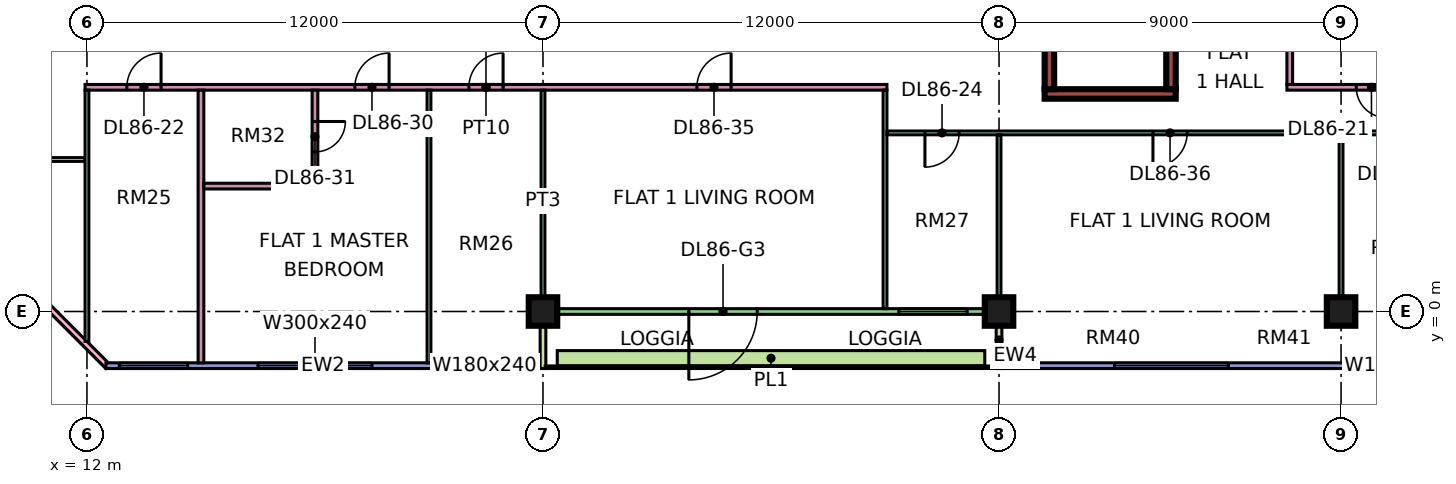
"""IFC4 building model, lengths in metres.
Left out: names, types, materials, properties, quantities, classifications, styles, units other than length and angle.
Written with IfcOpenShell. Run it as: python <this file> out.ifc"""

import sys

from ifc_helpers import new_model, si_unit, direction, frame, frame_2d, origin, origin_2d, place, context, subcontext, project, spatial, rectangle, extrude, element, fill, save


model = new_model("IFC4")
c1 = context("Model", 3, precision=1e-05, world=origin(), true_north=direction((0.0, 1.0)))
c2 = subcontext(c1, "Body", "Model", "MODEL_VIEW")
j1 = project(units=[si_unit("LENGTHUNIT", "METRE"), si_unit("PLANEANGLEUNIT", "RADIAN")], contexts=[c1])
p1 = place(None, origin())
s1 = spatial("IfcSite", under=j1, at=p1, CompositionType="ELEMENT")
p2 = place(p1, origin())
s2 = spatial("IfcBuilding", under=s1, at=p2, CompositionType="ELEMENT")
p3 = place(p2, frame((0.0, 0.0, 368.9)))
s3 = spatial("IfcBuildingStorey", under=s2, at=p3, CompositionType="ELEMENT", Elevation=368.9)
for number, where, z_axis, x_axis in (
    (1, (24.0, 0.0, 0.0), (0.0, 0.0, 1.0), (1.0, 0.0, 0.0)),
    (2, (36.0, 0.0, 0.0), (0.0, 0.0, 1.0), (1.0, 0.0, 0.0)),
    (3, (45.0, 0.0, 0.0), (0.0, 0.0, 1.0), (1.0, 0.0, 0.0)),
):
    element("IfcColumn", number, at=place(p3, frame(where, z_axis=z_axis, x_axis=x_axis)), inside=s3, PredefinedType="COLUMN", context=c2, shape_type="SweptSolid", body=[
        extrude(rectangle(XDim=0.75, YDim=0.75, at=origin_2d()), origin(), (0.0, 0.0, 1.0), 3.75),
    ])
p4 = place(p3, frame((37.2, 5.725, 0.0), z_axis=(0.0, 0.0, 1.0), x_axis=(1.0, 0.0, 0.0)))
e4 = element("IfcWall", 4, at=p4, inside=s3, PredefinedType="SHEAR", context=c2, shape_type="SweptSolid", body=[
    extrude(rectangle(XDim=3.45, YDim=0.25, at=frame_2d((1.725, 0.0))), origin(), (0.0, 0.0, 1.0), 3.75),
])
for number, where, z_axis, x_axis in (
    (5, (37.325, 5.85, 0.0), (0.0, 0.0, 1.0), (0.0, 1.0, 0.0)),
    (6, (40.525, 5.85, 0.0), (0.0, 0.0, 1.0), (0.0, 1.0, 0.0)),
):
    element("IfcWall", number, at=place(p3, frame(where, z_axis=z_axis, x_axis=x_axis)), inside=s3, PredefinedType="SHEAR", context=c2, shape_type="SweptSolid", body=[
        extrude(rectangle(XDim=6.5, YDim=0.25, at=frame_2d((3.25, 0.0))), origin(), (0.0, 0.0, 1.0), 3.75),
    ])
p5 = place(p3, frame((-1.447, 12.553, 0.0), z_axis=(0.0, 0.0, 1.0), x_axis=(0.707106781187, -0.707106781187, 0.0)))
e7 = element("IfcWall", 7, at=p5, inside=s3, PredefinedType="SOLIDWALL", context=c2, shape_type="SweptSolid", body=[
    extrude(rectangle(XDim=19.799, YDim=0.15, at=frame_2d((9.899, 0.0))), origin(), (0.0, 0.0, 1.0), 3.35),
])
p6 = place(p5, frame((2.212, 0.0, 0.45)))
e8 = element("IfcOpeningElement", 8, at=p6, cuts=e7, PredefinedType="OPENING", context=c2, shape_type="SweptSolid", body=[
    extrude(rectangle(XDim=3.0, YDim=2.4, at=frame_2d((1.5, 1.2))), frame((0.0, 0.085, 0.0), z_axis=(0.0, -1.0, 0.0), x_axis=(1.0, 0.0, 0.0)), (0.0, 0.0, 1.0), 0.17),
])
p7 = place(p5, frame((10.216, 0.0, 0.45)))
e9 = element("IfcOpeningElement", 9, at=p7, cuts=e7, PredefinedType="OPENING", context=c2, shape_type="SweptSolid", body=[
    extrude(rectangle(XDim=3.0, YDim=2.4, at=frame_2d((1.5, 1.2))), frame((0.0, 0.085, 0.0), z_axis=(0.0, -1.0, 0.0), x_axis=(1.0, 0.0, 0.0)), (0.0, 0.0, 1.0), 0.17),
])
p8 = place(p3, frame((12.5, -1.425, 0.0), z_axis=(0.0, 0.0, 1.0), x_axis=(1.0, 0.0, 0.0)))
e10 = element("IfcWall", 10, at=p8, inside=s3, PredefinedType="SOLIDWALL", context=c2, shape_type="SweptSolid", body=[
    extrude(rectangle(XDim=11.425, YDim=0.15, at=frame_2d((5.712, 0.0))), origin(), (0.0, 0.0, 1.0), 3.35),
])
p9 = place(p8, frame((0.35, 0.0, 0.45)))
e11 = element("IfcOpeningElement", 11, at=p9, cuts=e10, PredefinedType="OPENING", context=c2, shape_type="SweptSolid", body=[
    extrude(rectangle(XDim=1.8, YDim=2.4, at=frame_2d((0.9, 1.2))), frame((0.0, 0.085, 0.0), z_axis=(0.0, -1.0, 0.0), x_axis=(1.0, 0.0, 0.0)), (0.0, 0.0, 1.0), 0.17),
])
p10 = place(p8, frame((4.0, 0.0, 0.45)))
e12 = element("IfcOpeningElement", 12, at=p10, cuts=e10, PredefinedType="OPENING", context=c2, shape_type="SweptSolid", body=[
    extrude(rectangle(XDim=3.0, YDim=2.4, at=frame_2d((1.5, 1.2))), frame((0.0, 0.085, 0.0), z_axis=(0.0, -1.0, 0.0), x_axis=(1.0, 0.0, 0.0)), (0.0, 0.0, 1.0), 0.17),
])
p11 = place(p8, frame((9.062, 0.0, 0.45)))
e13 = element("IfcOpeningElement", 13, at=p11, cuts=e10, PredefinedType="OPENING", context=c2, shape_type="SweptSolid", body=[
    extrude(rectangle(XDim=1.8, YDim=2.4, at=frame_2d((0.9, 1.2))), frame((0.0, 0.085, 0.0), z_axis=(0.0, -1.0, 0.0), x_axis=(1.0, 0.0, 0.0)), (0.0, 0.0, 1.0), 0.17),
])
p12 = place(p3, frame((24.075, 0.0, 0.0), z_axis=(0.0, 0.0, 1.0), x_axis=(1.0, 0.0, 0.0)))
e14 = element("IfcWall", 14, at=p12, inside=s3, PredefinedType="SOLIDWALL", context=c2, shape_type="SweptSolid", body=[
    extrude(rectangle(XDim=11.85, YDim=0.15, at=frame_2d((5.925, 0.0))), origin(), (0.0, 0.0, 1.0), 3.35),
])
p13 = place(p12, frame((3.762, 0.0, 0.0)))
e15 = element("IfcOpeningElement", 15, at=p13, cuts=e14, PredefinedType="OPENING", context=c2, shape_type="SweptSolid", body=[
    extrude(rectangle(XDim=1.8, YDim=2.4, at=frame_2d((0.9, 1.2))), frame((0.0, 0.085, 0.0), z_axis=(0.0, -1.0, 0.0), x_axis=(1.0, 0.0, 0.0)), (0.0, 0.0, 1.0), 0.17),
])
p14 = place(p12, frame((9.288, 0.0, 0.45)))
e16 = element("IfcOpeningElement", 16, at=p14, cuts=e14, PredefinedType="OPENING", context=c2, shape_type="SweptSolid", body=[
    extrude(rectangle(XDim=1.8, YDim=2.4, at=frame_2d((0.9, 1.2))), frame((0.0, 0.085, 0.0), z_axis=(0.0, -1.0, 0.0), x_axis=(1.0, 0.0, 0.0)), (0.0, 0.0, 1.0), 0.17),
])
for number, where, z_axis, x_axis in (
    (17, (24.0, -1.5, 0.0), (0.0, 0.0, 1.0), (0.0, 1.0, 0.0)),
    (18, (36.0, -1.5, 0.0), (0.0, 0.0, 1.0), (0.0, 1.0, 0.0)),
):
    element("IfcWall", number, at=place(p3, frame(where, z_axis=z_axis, x_axis=x_axis)), inside=s3, PredefinedType="SOLIDWALL", context=c2, shape_type="SweptSolid", body=[
        extrude(rectangle(XDim=1.5, YDim=0.15, at=frame_2d((0.75, 0.0))), origin(), (0.0, 0.0, 1.0), 3.35),
    ])
p15 = place(p3, frame((36.075, -1.425, 0.0), z_axis=(0.0, 0.0, 1.0), x_axis=(1.0, 0.0, 0.0)))
e19 = element("IfcWall", 19, at=p15, inside=s3, PredefinedType="SOLIDWALL", context=c2, shape_type="SweptSolid", body=[
    extrude(rectangle(XDim=11.85, YDim=0.15, at=frame_2d((5.925, 0.0))), origin(), (0.0, 0.0, 1.0), 3.35),
])
p16 = place(p15, frame((2.962, 0.0, 0.45)))
e20 = element("IfcOpeningElement", 20, at=p16, cuts=e19, PredefinedType="OPENING", context=c2, shape_type="SweptSolid", body=[
    extrude(rectangle(XDim=3.0, YDim=2.4, at=frame_2d((1.5, 1.2))), frame((0.0, 0.085, 0.0), z_axis=(0.0, -1.0, 0.0), x_axis=(1.0, 0.0, 0.0)), (0.0, 0.0, 1.0), 0.17),
])
p17 = place(p15, frame((9.488, 0.0, 0.45)))
e21 = element("IfcOpeningElement", 21, at=p17, cuts=e19, PredefinedType="OPENING", context=c2, shape_type="SweptSolid", body=[
    extrude(rectangle(XDim=1.8, YDim=2.4, at=frame_2d((0.9, 1.2))), frame((0.0, 0.085, 0.0), z_axis=(0.0, -1.0, 0.0), x_axis=(1.0, 0.0, 0.0)), (0.0, 0.0, 1.0), 0.17),
])
p18 = place(p3, frame((24.375, -1.229, 0.0), z_axis=(0.0, 0.0, 1.0), x_axis=(1.0, 0.0, 0.0)))
e22 = element("IfcWall", 22, at=p18, inside=s3, PredefinedType="SOLIDWALL", context=c2, shape_type="SweptSolid", body=[
    extrude(rectangle(XDim=11.25, YDim=0.4, at=frame_2d((5.625, 0.0))), origin(), (0.0, 0.0, 1.0), 0.7),
])
p19 = place(p3, frame((9.05, 4.0, 0.0), z_axis=(0.0, 0.0, 1.0), x_axis=(1.0, 0.0, 0.0)))
e23 = element("IfcWall", 23, at=p19, inside=s3, PredefinedType="PARTITIONING", context=c2, shape_type="SweptSolid", body=[
    extrude(rectangle(XDim=2.9, YDim=0.1, at=frame_2d((1.45, 0.0))), origin(), (0.0, 0.0, 1.0), 3.35),
])
p20 = place(p3, frame((11.95, 5.9, 0.0), z_axis=(0.0, 0.0, 1.0), x_axis=(1.0, 0.0, 0.0)))
e24 = element("IfcWall", 24, at=p20, inside=s3, PredefinedType="PARTITIONING", context=c2, shape_type="SweptSolid", body=[
    extrude(rectangle(XDim=21.1, YDim=0.15, at=frame_2d((10.55, 0.0))), origin(), (0.0, 0.0, 1.0), 3.35),
])
p21 = place(p20, frame((1.1, 0.0, 0.0)))
e25 = element("IfcOpeningElement", 25, at=p21, cuts=e24, PredefinedType="OPENING", context=c2, shape_type="SweptSolid", body=[
    extrude(rectangle(XDim=0.9, YDim=2.1, at=frame_2d((0.45, 1.05))), frame((0.0, 0.085, 0.0), z_axis=(0.0, -1.0, 0.0), x_axis=(1.0, 0.0, 0.0)), (0.0, 0.0, 1.0), 0.17),
])
p22 = place(p20, frame((10.1, 0.0, 0.0)))
e26 = element("IfcOpeningElement", 26, at=p22, cuts=e24, PredefinedType="OPENING", context=c2, shape_type="SweptSolid", body=[
    extrude(rectangle(XDim=0.9, YDim=2.1, at=frame_2d((0.45, 1.05))), frame((0.0, 0.085, 0.0), z_axis=(0.0, -1.0, 0.0), x_axis=(1.0, 0.0, 0.0)), (0.0, 0.0, 1.0), 0.17),
])
p23 = place(p20, frame((7.1, 0.0, 0.0)))
e27 = element("IfcOpeningElement", 27, at=p23, cuts=e24, PredefinedType="OPENING", context=c2, shape_type="SweptSolid", body=[
    extrude(rectangle(XDim=0.9, YDim=2.1, at=frame_2d((0.45, 1.05))), frame((0.0, 0.085, 0.0), z_axis=(0.0, -1.0, 0.0), x_axis=(1.0, 0.0, 0.0)), (0.0, 0.0, 1.0), 0.17),
])
p24 = place(p20, frame((16.1, 0.0, 0.0)))
e28 = element("IfcOpeningElement", 28, at=p24, cuts=e24, PredefinedType="OPENING", context=c2, shape_type="SweptSolid", body=[
    extrude(rectangle(XDim=0.9, YDim=2.1, at=frame_2d((0.45, 1.05))), frame((0.0, 0.085, 0.0), z_axis=(0.0, -1.0, 0.0), x_axis=(1.0, 0.0, 0.0)), (0.0, 0.0, 1.0), 0.17),
])
p25 = place(p3, frame((12.0, -0.788, 0.0), z_axis=(0.0, 0.0, 1.0), x_axis=(0.0, 1.0, 0.0)))
e29 = element("IfcWall", 29, at=p25, inside=s3, PredefinedType="PARTITIONING", context=c2, shape_type="SweptSolid", body=[
    extrude(rectangle(XDim=6.613, YDim=0.1, at=frame_2d((3.306, 0.0))), origin(), (0.0, 0.0, 1.0), 3.35),
])
p26 = place(p3, frame((15.0, -1.351, 0.0), z_axis=(0.0, 0.0, 1.0), x_axis=(0.0, 1.0, 0.0)))
e30 = element("IfcWall", 30, at=p26, inside=s3, PredefinedType="PARTITIONING", context=c2, shape_type="SweptSolid", body=[
    extrude(rectangle(XDim=7.176, YDim=0.15, at=frame_2d((3.588, 0.0))), origin(), (0.0, 0.0, 1.0), 3.35),
])
p27 = place(p3, frame((15.075, 3.3, 0.0), z_axis=(0.0, 0.0, 1.0), x_axis=(1.0, 0.0, 0.0)))
e31 = element("IfcWall", 31, at=p27, inside=s3, PredefinedType="PARTITIONING", context=c2, shape_type="SweptSolid", body=[
    extrude(rectangle(XDim=3.0, YDim=0.15, at=frame_2d((1.5, 0.0))), origin(), (0.0, 0.0, 1.0), 3.35),
])
p28 = place(p3, frame((18.0, 3.375, 0.0), z_axis=(0.0, 0.0, 1.0), x_axis=(0.0, 1.0, 0.0)))
e32 = element("IfcWall", 32, at=p28, inside=s3, PredefinedType="PARTITIONING", context=c2, shape_type="SweptSolid", body=[
    extrude(rectangle(XDim=2.45, YDim=0.15, at=frame_2d((1.225, 0.0))), origin(), (0.0, 0.0, 1.0), 3.35),
])
p29 = place(p28, frame((0.825, 0.0, 0.0)))
e33 = element("IfcOpeningElement", 33, at=p29, cuts=e32, PredefinedType="OPENING", context=c2, shape_type="SweptSolid", body=[
    extrude(rectangle(XDim=0.8, YDim=2.1, at=frame_2d((0.4, 1.05))), frame((0.0, 0.085, 0.0), z_axis=(0.0, -1.0, 0.0), x_axis=(1.0, 0.0, 0.0)), (0.0, 0.0, 1.0), 0.17),
])
p30 = place(p3, frame((21.0, -1.351, 0.0), z_axis=(0.0, 0.0, 1.0), x_axis=(0.0, 1.0, 0.0)))
e34 = element("IfcWall", 34, at=p30, inside=s3, PredefinedType="PARTITIONING", context=c2, shape_type="SweptSolid", body=[
    extrude(rectangle(XDim=7.176, YDim=0.1, at=frame_2d((3.588, 0.0))), origin(), (0.0, 0.0, 1.0), 3.35),
])
p31 = place(p3, frame((24.0, 0.0, 0.0), z_axis=(0.0, 0.0, 1.0), x_axis=(0.0, 1.0, 0.0)))
e35 = element("IfcWall", 35, at=p31, inside=s3, PredefinedType="PARTITIONING", context=c2, shape_type="SweptSolid", body=[
    extrude(rectangle(XDim=5.825, YDim=0.1, at=frame_2d((2.913, 0.0))), origin(), (0.0, 0.0, 1.0), 3.35),
])
p32 = place(p3, frame((33.0, 0.074, 0.0), z_axis=(0.0, 0.0, 1.0), x_axis=(0.0, 1.0, 0.0)))
e36 = element("IfcWall", 36, at=p32, inside=s3, PredefinedType="PARTITIONING", context=c2, shape_type="SweptSolid", body=[
    extrude(rectangle(XDim=5.751, YDim=0.1, at=frame_2d((2.875, 0.0))), origin(), (0.0, 0.0, 1.0), 3.35),
])
p33 = place(p3, frame((33.05, 4.7, 0.0), z_axis=(0.0, 0.0, 1.0), x_axis=(1.0, 0.0, 0.0)))
e37 = element("IfcWall", 37, at=p33, inside=s3, PredefinedType="PARTITIONING", context=c2, shape_type="SweptSolid", body=[
    extrude(rectangle(XDim=20.876, YDim=0.1, at=frame_2d((10.438, 0.0))), origin(), (0.0, 0.0, 1.0), 3.35),
])
p34 = place(p33, frame((1.0, 0.0, 0.0)))
e38 = element("IfcOpeningElement", 38, at=p34, cuts=e37, PredefinedType="OPENING", context=c2, shape_type="SweptSolid", body=[
    extrude(rectangle(XDim=0.9, YDim=2.1, at=frame_2d((0.45, 1.05))), frame((0.0, 0.06, 0.0), z_axis=(0.0, -1.0, 0.0), x_axis=(1.0, 0.0, 0.0)), (0.0, 0.0, 1.0), 0.12),
])
p35 = place(p33, frame((13.0, 0.0, 0.0)))
e39 = element("IfcOpeningElement", 39, at=p35, cuts=e37, PredefinedType="OPENING", context=c2, shape_type="SweptSolid", body=[
    extrude(rectangle(XDim=0.9, YDim=2.1, at=frame_2d((0.45, 1.05))), frame((0.0, 0.06, 0.0), z_axis=(0.0, -1.0, 0.0), x_axis=(1.0, 0.0, 0.0)), (0.0, 0.0, 1.0), 0.12),
])
p36 = place(p33, frame((16.0, 0.0, 0.0)))
e40 = element("IfcOpeningElement", 40, at=p36, cuts=e37, PredefinedType="OPENING", context=c2, shape_type="SweptSolid", body=[
    extrude(rectangle(XDim=0.9, YDim=2.1, at=frame_2d((0.45, 1.05))), frame((0.0, 0.06, 0.0), z_axis=(0.0, -1.0, 0.0), x_axis=(1.0, 0.0, 0.0)), (0.0, 0.0, 1.0), 0.12),
])
p37 = place(p33, frame((19.0, 0.0, 0.0)))
e41 = element("IfcOpeningElement", 41, at=p37, cuts=e37, PredefinedType="OPENING", context=c2, shape_type="SweptSolid", body=[
    extrude(rectangle(XDim=0.9, YDim=2.1, at=frame_2d((0.45, 1.05))), frame((0.0, 0.06, 0.0), z_axis=(0.0, -1.0, 0.0), x_axis=(1.0, 0.0, 0.0)), (0.0, 0.0, 1.0), 0.12),
])
p38 = place(p33, frame((7.0, 0.0, 0.0)))
e42 = element("IfcOpeningElement", 42, at=p38, cuts=e37, PredefinedType="OPENING", context=c2, shape_type="SweptSolid", body=[
    extrude(rectangle(XDim=0.9, YDim=2.1, at=frame_2d((0.45, 1.05))), frame((0.0, 0.06, 0.0), z_axis=(0.0, -1.0, 0.0), x_axis=(1.0, 0.0, 0.0)), (0.0, 0.0, 1.0), 0.12),
])
p39 = place(p3, frame((36.0, 0.0, 0.0), z_axis=(0.0, 0.0, 1.0), x_axis=(0.0, 1.0, 0.0)))
e43 = element("IfcWall", 43, at=p39, inside=s3, PredefinedType="PARTITIONING", context=c2, shape_type="SweptSolid", body=[
    extrude(rectangle(XDim=4.65, YDim=0.1, at=frame_2d((2.325, 0.0))), origin(), (0.0, 0.0, 1.0), 3.35),
])
p40 = place(p3, frame((43.575, 5.9, 0.0), z_axis=(0.0, 0.0, 1.0), x_axis=(1.0, 0.0, 0.0)))
e44 = element("IfcWall", 44, at=p40, inside=s3, PredefinedType="PARTITIONING", context=c2, shape_type="SweptSolid", body=[
    extrude(rectangle(XDim=10.351, YDim=0.15, at=frame_2d((5.176, 0.0))), origin(), (0.0, 0.0, 1.0), 3.35),
])
p41 = place(p40, frame((1.825, 0.0, 0.0)))
e45 = element("IfcOpeningElement", 45, at=p41, cuts=e44, PredefinedType="OPENING", context=c2, shape_type="SweptSolid", body=[
    extrude(rectangle(XDim=0.8, YDim=2.1, at=frame_2d((0.4, 1.05))), frame((0.0, 0.085, 0.0), z_axis=(0.0, -1.0, 0.0), x_axis=(1.0, 0.0, 0.0)), (0.0, 0.0, 1.0), 0.17),
])
p42 = place(p40, frame((6.975, 0.0, 0.0)))
e46 = element("IfcOpeningElement", 46, at=p42, cuts=e44, PredefinedType="OPENING", context=c2, shape_type="SweptSolid", body=[
    extrude(rectangle(XDim=0.9, YDim=2.1, at=frame_2d((0.45, 1.05))), frame((0.0, 0.085, 0.0), z_axis=(0.0, -1.0, 0.0), x_axis=(1.0, 0.0, 0.0)), (0.0, 0.0, 1.0), 0.17),
])
p43 = place(p3, frame((43.65, 5.975, 0.0), z_axis=(0.0, 0.0, 1.0), x_axis=(0.0, 1.0, 0.0)))
e47 = element("IfcWall", 47, at=p43, inside=s3, PredefinedType="PARTITIONING", context=c2, shape_type="SweptSolid", body=[
    extrude(rectangle(XDim=6.3, YDim=0.15, at=frame_2d((3.15, 0.0))), origin(), (0.0, 0.0, 1.0), 3.35),
])
p44 = place(p43, frame((4.275, 0.0, 0.0)))
e48 = element("IfcOpeningElement", 48, at=p44, cuts=e47, PredefinedType="OPENING", context=c2, shape_type="SweptSolid", body=[
    extrude(rectangle(XDim=0.9, YDim=2.1, at=frame_2d((0.45, 1.05))), frame((0.0, 0.085, 0.0), z_axis=(0.0, -1.0, 0.0), x_axis=(1.0, 0.0, 0.0)), (0.0, 0.0, 1.0), 0.17),
])
p45 = place(p3, frame((45.0, 0.0, 0.0), z_axis=(0.0, 0.0, 1.0), x_axis=(0.0, 1.0, 0.0)))
e49 = element("IfcWall", 49, at=p45, inside=s3, PredefinedType="PARTITIONING", context=c2, shape_type="SweptSolid", body=[
    extrude(rectangle(XDim=4.65, YDim=0.1, at=frame_2d((2.325, 0.0))), origin(), (0.0, 0.0, 1.0), 3.35),
])
p46 = place(p9, origin())
e50 = element("IfcWindow", 50, at=p46, inside=s3, PartitioningType="SINGLE_PANEL", PredefinedType="WINDOW", context=c2, shape_type="SweptSolid", body=[
    extrude(rectangle(XDim=1.8, YDim=2.4, at=frame_2d((0.9, 1.2))), frame((0.0, 0.03, 0.0), z_axis=(0.0, -1.0, 0.0), x_axis=(1.0, 0.0, 0.0)), (0.0, 0.0, 1.0), 0.06),
])
fill(e11, e50)
p47 = place(p10, origin())
e51 = element("IfcWindow", 51, at=p47, inside=s3, PartitioningType="SINGLE_PANEL", PredefinedType="WINDOW", context=c2, shape_type="SweptSolid", body=[
    extrude(rectangle(XDim=3.0, YDim=2.4, at=frame_2d((1.5, 1.2))), frame((0.0, 0.03, 0.0), z_axis=(0.0, -1.0, 0.0), x_axis=(1.0, 0.0, 0.0)), (0.0, 0.0, 1.0), 0.06),
])
fill(e12, e51)
p48 = place(p11, origin())
e52 = element("IfcWindow", 52, at=p48, inside=s3, PartitioningType="SINGLE_PANEL", PredefinedType="WINDOW", context=c2, shape_type="SweptSolid", body=[
    extrude(rectangle(XDim=1.8, YDim=2.4, at=frame_2d((0.9, 1.2))), frame((0.0, 0.03, 0.0), z_axis=(0.0, -1.0, 0.0), x_axis=(1.0, 0.0, 0.0)), (0.0, 0.0, 1.0), 0.06),
])
fill(e13, e52)
p49 = place(p13, frame((1.8, 0.0, 0.0), z_axis=(0.0, 0.0, 1.0), x_axis=(-1.0, 0.0, 0.0)))
e53 = element("IfcDoor", 53, at=p49, inside=s3, OperationType="DOUBLE_DOOR_SINGLE_SWING", PredefinedType="DOOR", context=c2, shape_type="SweptSolid", body=[
    extrude(rectangle(XDim=1.8, YDim=2.4, at=frame_2d((0.9, 1.2))), frame((0.0, 0.025, 0.0), z_axis=(0.0, -1.0, 0.0), x_axis=(1.0, 0.0, 0.0)), (0.0, 0.0, 1.0), 0.05),
])
fill(e15, e53)
p50 = place(p14, origin())
e54 = element("IfcWindow", 54, at=p50, inside=s3, PartitioningType="SINGLE_PANEL", PredefinedType="WINDOW", context=c2, shape_type="SweptSolid", body=[
    extrude(rectangle(XDim=1.8, YDim=2.4, at=frame_2d((0.9, 1.2))), frame((0.0, 0.03, 0.0), z_axis=(0.0, -1.0, 0.0), x_axis=(1.0, 0.0, 0.0)), (0.0, 0.0, 1.0), 0.06),
])
fill(e16, e54)
p51 = place(p16, origin())
e55 = element("IfcWindow", 55, at=p51, inside=s3, PartitioningType="SINGLE_PANEL", PredefinedType="WINDOW", context=c2, shape_type="SweptSolid", body=[
    extrude(rectangle(XDim=3.0, YDim=2.4, at=frame_2d((1.5, 1.2))), frame((0.0, 0.03, 0.0), z_axis=(0.0, -1.0, 0.0), x_axis=(1.0, 0.0, 0.0)), (0.0, 0.0, 1.0), 0.06),
])
fill(e20, e55)
p52 = place(p17, origin())
e56 = element("IfcWindow", 56, at=p52, inside=s3, PartitioningType="SINGLE_PANEL", PredefinedType="WINDOW", context=c2, shape_type="SweptSolid", body=[
    extrude(rectangle(XDim=1.8, YDim=2.4, at=frame_2d((0.9, 1.2))), frame((0.0, 0.03, 0.0), z_axis=(0.0, -1.0, 0.0), x_axis=(1.0, 0.0, 0.0)), (0.0, 0.0, 1.0), 0.06),
])
fill(e21, e56)
p53 = place(p41, origin())
e57 = element("IfcDoor", 57, at=p53, inside=s3, OperationType="SINGLE_SWING_RIGHT", PredefinedType="DOOR", context=c2, shape_type="SweptSolid", body=[
    extrude(rectangle(XDim=0.8, YDim=2.1, at=frame_2d((0.4, 1.05))), frame((0.0, 0.025, 0.0), z_axis=(0.0, -1.0, 0.0), x_axis=(1.0, 0.0, 0.0)), (0.0, 0.0, 1.0), 0.05),
])
fill(e45, e57)
p54 = place(p21, frame((0.9, 0.0, 0.0), z_axis=(0.0, 0.0, 1.0), x_axis=(-1.0, 0.0, 0.0)))
e58 = element("IfcDoor", 58, at=p54, inside=s3, OperationType="SINGLE_SWING_RIGHT", PredefinedType="DOOR", context=c2, shape_type="SweptSolid", body=[
    extrude(rectangle(XDim=0.9, YDim=2.1, at=frame_2d((0.45, 1.05))), frame((0.0, 0.025, 0.0), z_axis=(0.0, -1.0, 0.0), x_axis=(1.0, 0.0, 0.0)), (0.0, 0.0, 1.0), 0.05),
])
fill(e25, e58)
p55 = place(p22, frame((0.9, 0.0, 0.0), z_axis=(0.0, 0.0, 1.0), x_axis=(-1.0, 0.0, 0.0)))
e59 = element("IfcDoor", 59, at=p55, inside=s3, OperationType="SINGLE_SWING_RIGHT", PredefinedType="DOOR", context=c2, shape_type="SweptSolid", body=[
    extrude(rectangle(XDim=0.9, YDim=2.1, at=frame_2d((0.45, 1.05))), frame((0.0, 0.025, 0.0), z_axis=(0.0, -1.0, 0.0), x_axis=(1.0, 0.0, 0.0)), (0.0, 0.0, 1.0), 0.05),
])
fill(e26, e59)
p56 = place(p34, frame((0.9, 0.0, 0.0), z_axis=(0.0, 0.0, 1.0), x_axis=(-1.0, 0.0, 0.0)))
e60 = element("IfcDoor", 60, at=p56, inside=s3, OperationType="SINGLE_SWING_LEFT", PredefinedType="DOOR", context=c2, shape_type="SweptSolid", body=[
    extrude(rectangle(XDim=0.9, YDim=2.1, at=frame_2d((0.45, 1.05))), frame((0.0, 0.025, 0.0), z_axis=(0.0, -1.0, 0.0), x_axis=(1.0, 0.0, 0.0)), (0.0, 0.0, 1.0), 0.05),
])
fill(e38, e60)
p57 = place(p23, frame((0.9, 0.0, 0.0), z_axis=(0.0, 0.0, 1.0), x_axis=(-1.0, 0.0, 0.0)))
e61 = element("IfcDoor", 61, at=p57, inside=s3, OperationType="SINGLE_SWING_RIGHT", PredefinedType="DOOR", context=c2, shape_type="SweptSolid", body=[
    extrude(rectangle(XDim=0.9, YDim=2.1, at=frame_2d((0.45, 1.05))), frame((0.0, 0.025, 0.0), z_axis=(0.0, -1.0, 0.0), x_axis=(1.0, 0.0, 0.0)), (0.0, 0.0, 1.0), 0.05),
])
fill(e27, e61)
p58 = place(p29, origin())
e62 = element("IfcDoor", 62, at=p58, inside=s3, OperationType="SINGLE_SWING_RIGHT", PredefinedType="DOOR", context=c2, shape_type="SweptSolid", body=[
    extrude(rectangle(XDim=0.8, YDim=2.1, at=frame_2d((0.4, 1.05))), frame((0.0, 0.025, 0.0), z_axis=(0.0, -1.0, 0.0), x_axis=(1.0, 0.0, 0.0)), (0.0, 0.0, 1.0), 0.05),
])
fill(e33, e62)
p59 = place(p24, frame((0.9, 0.0, 0.0), z_axis=(0.0, 0.0, 1.0), x_axis=(-1.0, 0.0, 0.0)))
e63 = element("IfcDoor", 63, at=p59, inside=s3, OperationType="SINGLE_SWING_RIGHT", PredefinedType="DOOR", context=c2, shape_type="SweptSolid", body=[
    extrude(rectangle(XDim=0.9, YDim=2.1, at=frame_2d((0.45, 1.05))), frame((0.0, 0.025, 0.0), z_axis=(0.0, -1.0, 0.0), x_axis=(1.0, 0.0, 0.0)), (0.0, 0.0, 1.0), 0.05),
])
fill(e28, e63)
p60 = place(p38, frame((0.9, 0.0, 0.0), z_axis=(0.0, 0.0, 1.0), x_axis=(-1.0, 0.0, 0.0)))
e64 = element("IfcDoor", 64, at=p60, inside=s3, OperationType="SINGLE_SWING_LEFT", PredefinedType="DOOR", context=c2, shape_type="SweptSolid", body=[
    extrude(rectangle(XDim=0.9, YDim=2.1, at=frame_2d((0.45, 1.05))), frame((0.0, 0.025, 0.0), z_axis=(0.0, -1.0, 0.0), x_axis=(1.0, 0.0, 0.0)), (0.0, 0.0, 1.0), 0.05),
])
fill(e42, e64)
save(model, sys.argv[1])
